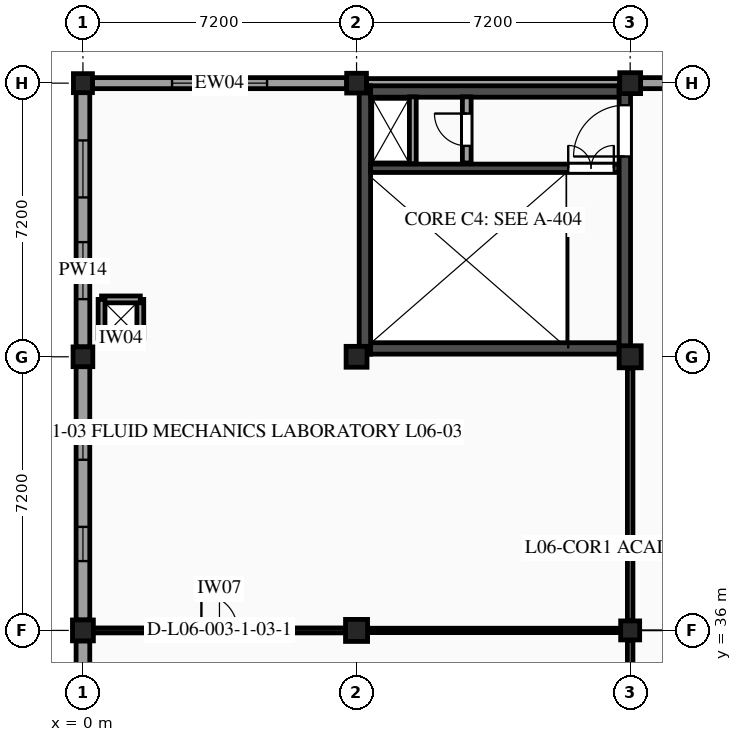
"""IFC4 building model, lengths in metres.
Left out: names, types, materials, properties, quantities, classifications, styles, units other than length and angle.
Written with IfcOpenShell. Run it as: python <this file> out.ifc"""

import sys

from ifc_helpers import new_model, si_unit, direction, frame, frame_2d, origin, origin_2d, place, context, subcontext, project, spatial, rectangle, extrude, element, fill, save


model = new_model("IFC4")
c1 = context("Model", 3, precision=1e-05, world=origin(), true_north=direction((0.0, 1.0)))
c2 = subcontext(c1, "Body", "Model", "MODEL_VIEW")
j1 = project(units=[si_unit("LENGTHUNIT", "METRE"), si_unit("PLANEANGLEUNIT", "RADIAN")], contexts=[c1])
p1 = place(None, origin())
s1 = spatial("IfcSite", under=j1, at=p1, CompositionType="ELEMENT")
p2 = place(p1, origin())
s2 = spatial("IfcBuilding", under=s1, at=p2, CompositionType="ELEMENT")
p3 = place(p2, frame((0.0, 0.0, 26.7)))
s3 = spatial("IfcBuildingStorey", under=s2, at=p3, CompositionType="ELEMENT", Elevation=26.7)
p4 = place(p3, frame((0.0, 36.0, 0.0), z_axis=(0.0, 0.0, 1.0), x_axis=(1.0, 0.0, 0.0)))
e1 = element("IfcColumn", 1, at=p4, inside=s3, PredefinedType="COLUMN", context=c2, shape_type="SweptSolid", body=[
    extrude(rectangle(XDim=0.55, YDim=0.55, at=origin_2d()), origin(), (0.0, 0.0, 1.0), 3.9),
])
p5 = place(p3, frame((0.0, 43.2, 0.0), z_axis=(0.0, 0.0, 1.0), x_axis=(1.0, 0.0, 0.0)))
e2 = element("IfcColumn", 2, at=p5, inside=s3, PredefinedType="COLUMN", context=c2, shape_type="SweptSolid", body=[
    extrude(rectangle(XDim=0.52, YDim=0.52, at=origin_2d()), origin(), (0.0, 0.0, 1.0), 3.9),
])
p6 = place(p3, frame((0.0, 50.4, 0.0), z_axis=(0.0, 0.0, 1.0), x_axis=(1.0, 0.0, 0.0)))
e3 = element("IfcColumn", 3, at=p6, inside=s3, PredefinedType="COLUMN", context=c2, shape_type="SweptSolid", body=[
    extrude(rectangle(XDim=0.5, YDim=0.5, at=origin_2d()), origin(), (0.0, 0.0, 1.0), 3.9),
])
p7 = place(p3, frame((7.2, 36.0, 0.0), z_axis=(0.0, 0.0, 1.0), x_axis=(1.0, 0.0, 0.0)))
e4 = element("IfcColumn", 4, at=p7, inside=s3, PredefinedType="COLUMN", context=c2, shape_type="SweptSolid", body=[
    extrude(rectangle(XDim=0.58, YDim=0.58, at=origin_2d()), origin(), (0.0, 0.0, 1.0), 3.9),
])
p8 = place(p3, frame((7.2, 43.2, 0.0), z_axis=(0.0, 0.0, 1.0), x_axis=(1.0, 0.0, 0.0)))
e5 = element("IfcColumn", 5, at=p8, inside=s3, PredefinedType="COLUMN", context=c2, shape_type="SweptSolid", body=[
    extrude(rectangle(XDim=0.55, YDim=0.55, at=origin_2d()), origin(), (0.0, 0.0, 1.0), 3.9),
])
p9 = place(p3, frame((7.2, 50.4, 0.0), z_axis=(0.0, 0.0, 1.0), x_axis=(1.0, 0.0, 0.0)))
e6 = element("IfcColumn", 6, at=p9, inside=s3, PredefinedType="COLUMN", context=c2, shape_type="SweptSolid", body=[
    extrude(rectangle(XDim=0.52, YDim=0.52, at=origin_2d()), origin(), (0.0, 0.0, 1.0), 3.9),
])
p10 = place(p3, frame((14.4, 36.0, 0.0), z_axis=(0.0, 0.0, 1.0), x_axis=(1.0, 0.0, 0.0)))
e7 = element("IfcColumn", 7, at=p10, inside=s3, PredefinedType="COLUMN", context=c2, shape_type="SweptSolid", body=[
    extrude(rectangle(XDim=0.5, YDim=0.5, at=origin_2d()), origin(), (0.0, 0.0, 1.0), 3.9),
])
p11 = place(p3, frame((14.4, 43.2, 0.0), z_axis=(0.0, 0.0, 1.0), x_axis=(1.0, 0.0, 0.0)))
e8 = element("IfcColumn", 8, at=p11, inside=s3, PredefinedType="COLUMN", context=c2, shape_type="SweptSolid", body=[
    extrude(rectangle(XDim=0.58, YDim=0.58, at=origin_2d()), origin(), (0.0, 0.0, 1.0), 3.9),
])
p12 = place(p3, frame((14.4, 50.4, 0.0), z_axis=(0.0, 0.0, 1.0), x_axis=(1.0, 0.0, 0.0)))
e9 = element("IfcColumn", 9, at=p12, inside=s3, PredefinedType="COLUMN", context=c2, shape_type="SweptSolid", body=[
    extrude(rectangle(XDim=0.55, YDim=0.55, at=origin_2d()), origin(), (0.0, 0.0, 1.0), 3.9),
])
p13 = place(p3, frame((0.0, 29.09, 0.0), z_axis=(0.0, 0.0, 1.0), x_axis=(0.0, 1.0, 0.0)))
e10 = element("IfcWall", 10, at=p13, inside=s3, PredefinedType="STANDARD", context=c2, shape_type="SweptSolid", body=[
    extrude(rectangle(XDim=6.635, YDim=0.36, at=frame_2d((3.317, 0.0))), origin(), (0.0, 0.0, 1.0), 2.83),
])
p14 = place(p13, frame((1.466, 0.0, 1.15)))
e11 = element("IfcOpeningElement", 11, at=p14, cuts=e10, PredefinedType="OPENING", context=c2, shape_type="SweptSolid", body=[
    extrude(rectangle(XDim=1.05, YDim=1.35, at=frame_2d((0.525, 0.675))), frame((0.0, 0.19, 0.0), z_axis=(0.0, -1.0, 0.0), x_axis=(1.0, 0.0, 0.0)), (0.0, 0.0, 1.0), 0.38),
])
p15 = place(p13, frame((4.119, 0.0, 1.15)))
e12 = element("IfcOpeningElement", 12, at=p15, cuts=e10, PredefinedType="OPENING", context=c2, shape_type="SweptSolid", body=[
    extrude(rectangle(XDim=1.05, YDim=1.35, at=frame_2d((0.525, 0.675))), frame((0.0, 0.19, 0.0), z_axis=(0.0, -1.0, 0.0), x_axis=(1.0, 0.0, 0.0)), (0.0, 0.0, 1.0), 0.38),
])
p16 = place(p3, frame((0.0, 36.275, 0.0), z_axis=(0.0, 0.0, 1.0), x_axis=(0.0, 1.0, 0.0)))
e13 = element("IfcWall", 13, at=p16, inside=s3, PredefinedType="STANDARD", context=c2, shape_type="SweptSolid", body=[
    extrude(rectangle(XDim=6.665, YDim=0.36, at=frame_2d((3.333, 0.0))), origin(), (0.0, 0.0, 1.0), 2.83),
])
p17 = place(p16, frame((1.55, 0.0, 1.15)))
e14 = element("IfcOpeningElement", 14, at=p17, cuts=e13, PredefinedType="OPENING", context=c2, shape_type="SweptSolid", body=[
    extrude(rectangle(XDim=0.9, YDim=1.3, at=frame_2d((0.45, 0.65))), frame((0.0, 0.19, 0.0), z_axis=(0.0, -1.0, 0.0), x_axis=(1.0, 0.0, 0.0)), (0.0, 0.0, 1.0), 0.38),
])
p18 = place(p16, frame((4.216, 0.0, 1.15)))
e15 = element("IfcOpeningElement", 15, at=p18, cuts=e13, PredefinedType="OPENING", context=c2, shape_type="SweptSolid", body=[
    extrude(rectangle(XDim=0.9, YDim=1.3, at=frame_2d((0.45, 0.65))), frame((0.0, 0.19, 0.0), z_axis=(0.0, -1.0, 0.0), x_axis=(1.0, 0.0, 0.0)), (0.0, 0.0, 1.0), 0.38),
])
p19 = place(p3, frame((0.0, 43.46, 0.0), z_axis=(0.0, 0.0, 1.0), x_axis=(0.0, 1.0, 0.0)))
e16 = element("IfcWall", 16, at=p19, inside=s3, PredefinedType="STANDARD", context=c2, shape_type="SweptSolid", body=[
    extrude(rectangle(XDim=6.69, YDim=0.36, at=frame_2d((3.345, 0.0))), origin(), (0.0, 0.0, 1.0), 2.83),
])
p20 = place(p19, frame((1.257, 0.0, 1.15)))
e17 = element("IfcOpeningElement", 17, at=p20, cuts=e16, PredefinedType="OPENING", context=c2, shape_type="SweptSolid", body=[
    extrude(rectangle(XDim=1.5, YDim=1.2, at=frame_2d((0.75, 0.6))), frame((0.0, 0.19, 0.0), z_axis=(0.0, -1.0, 0.0), x_axis=(1.0, 0.0, 0.0)), (0.0, 0.0, 1.0), 0.38),
])
p21 = place(p19, frame((3.933, 0.0, 1.15)))
e18 = element("IfcOpeningElement", 18, at=p21, cuts=e16, PredefinedType="OPENING", context=c2, shape_type="SweptSolid", body=[
    extrude(rectangle(XDim=1.5, YDim=1.2, at=frame_2d((0.75, 0.6))), frame((0.0, 0.19, 0.0), z_axis=(0.0, -1.0, 0.0), x_axis=(1.0, 0.0, 0.0)), (0.0, 0.0, 1.0), 0.38),
])
p22 = place(p3, frame((0.25, 50.4, 0.0), z_axis=(0.0, 0.0, 1.0), x_axis=(1.0, 0.0, 0.0)))
e19 = element("IfcWall", 19, at=p22, inside=s3, PredefinedType="STANDARD", context=c2, shape_type="SweptSolid", body=[
    extrude(rectangle(XDim=6.69, YDim=0.29, at=frame_2d((3.345, 0.0))), origin(), (0.0, 0.0, 1.0), 2.83),
])
p23 = place(p22, frame((2.095, 0.0, 0.98)))
e20 = element("IfcOpeningElement", 20, at=p23, cuts=e19, PredefinedType="OPENING", context=c2, shape_type="SweptSolid", body=[
    extrude(rectangle(XDim=2.5, YDim=1.35, at=frame_2d((1.25, 0.675))), frame((0.0, 0.155, 0.0), z_axis=(0.0, -1.0, 0.0), x_axis=(1.0, 0.0, 0.0)), (0.0, 0.0, 1.0), 0.31),
])
p24 = place(p3, frame((7.46, 50.4, 0.0), z_axis=(0.0, 0.0, 1.0), x_axis=(1.0, 0.0, 0.0)))
e21 = element("IfcWall", 21, at=p24, inside=s3, PredefinedType="STANDARD", context=c2, shape_type="SweptSolid", body=[
    extrude(rectangle(XDim=6.665, YDim=0.24, at=frame_2d((3.333, 0.0))), origin(), (0.0, 0.0, 1.0), 2.83),
])
p25 = place(p3, frame((14.675, 50.4, 0.0), z_axis=(0.0, 0.0, 1.0), x_axis=(1.0, 0.0, 0.0)))
e22 = element("IfcWall", 22, at=p25, inside=s3, PredefinedType="STANDARD", context=c2, shape_type="SweptSolid", body=[
    extrude(rectangle(XDim=6.635, YDim=0.29, at=frame_2d((3.317, 0.0))), origin(), (0.0, 0.0, 1.0), 2.83),
])
p26 = place(p25, frame((0.917, 0.0, 0.98)))
e23 = element("IfcOpeningElement", 23, at=p26, cuts=e22, PredefinedType="OPENING", context=c2, shape_type="SweptSolid", body=[
    extrude(rectangle(XDim=4.8, YDim=1.5, at=frame_2d((2.4, 0.75))), frame((0.0, 0.155, 0.0), z_axis=(0.0, -1.0, 0.0), x_axis=(1.0, 0.0, 0.0)), (0.0, 0.0, 1.0), 0.31),
])
p27 = place(p3, frame((7.57, 43.42, 0.0), z_axis=(0.0, 0.0, 1.0), x_axis=(1.0, 0.0, 0.0)))
e24 = element("IfcWall", 24, at=p27, inside=s3, PredefinedType="SHEAR", context=c2, shape_type="SweptSolid", body=[
    extrude(rectangle(XDim=6.54, YDim=0.3, at=frame_2d((3.27, 0.0))), origin(), (0.0, 0.0, 1.0), 3.67),
])
p28 = place(p3, frame((7.42, 50.33, 0.0), z_axis=(0.0, 0.0, 1.0), x_axis=(0.0, -1.0, 0.0)))
e25 = element("IfcWall", 25, at=p28, inside=s3, PredefinedType="SHEAR", context=c2, shape_type="SweptSolid", body=[
    extrude(rectangle(XDim=7.06, YDim=0.3, at=frame_2d((3.53, 0.0))), origin(), (0.0, 0.0, 1.0), 3.67),
])
p29 = place(p3, frame((7.57, 50.18, 0.0), z_axis=(0.0, 0.0, 1.0), x_axis=(1.0, 0.0, 0.0)))
e26 = element("IfcWall", 26, at=p29, inside=s3, PredefinedType="SHEAR", context=c2, shape_type="SweptSolid", body=[
    extrude(rectangle(XDim=6.54, YDim=0.3, at=frame_2d((3.27, 0.0))), origin(), (0.0, 0.0, 1.0), 3.67),
])
p30 = place(p3, frame((7.57, 48.16, 0.0), z_axis=(0.0, 0.0, 1.0), x_axis=(1.0, 0.0, 0.0)))
e27 = element("IfcWall", 27, at=p30, inside=s3, PredefinedType="SHEAR", context=c2, shape_type="SweptSolid", body=[
    extrude(rectangle(XDim=6.54, YDim=0.22, at=frame_2d((3.27, 0.0))), origin(), (0.0, 0.0, 1.0), 3.67),
])
p31 = place(p30, frame((5.2, 0.0, 0.0)))
e28 = element("IfcOpeningElement", 28, at=p31, cuts=e27, PredefinedType="OPENING", context=c2, shape_type="SweptSolid", body=[
    extrude(rectangle(XDim=1.2, YDim=2.2, at=frame_2d((0.6, 1.1))), frame((0.0, 0.12, 0.0), z_axis=(0.0, -1.0, 0.0), x_axis=(1.0, 0.0, 0.0)), (0.0, 0.0, 1.0), 0.24),
])
p32 = place(p3, frame((10.1, 48.3, 0.0), z_axis=(0.0, 0.0, 1.0), x_axis=(0.0, 1.0, 0.0)))
e29 = element("IfcWall", 29, at=p32, inside=s3, PredefinedType="PARTITIONING", context=c2, shape_type="SweptSolid", body=[
    extrude(rectangle(XDim=1.74, YDim=0.23, at=frame_2d((0.87, 0.0))), origin(), (0.0, 0.0, 1.0), 3.67),
])
p33 = place(p32, frame((0.45, 0.0, 0.0)))
e30 = element("IfcOpeningElement", 30, at=p33, cuts=e29, PredefinedType="OPENING", context=c2, shape_type="SweptSolid", body=[
    extrude(rectangle(XDim=0.85, YDim=2.1, at=frame_2d((0.425, 1.05))), frame((0.0, 0.125, 0.0), z_axis=(0.0, -1.0, 0.0), x_axis=(1.0, 0.0, 0.0)), (0.0, 0.0, 1.0), 0.25),
])
p34 = place(p3, frame((8.68, 48.28, 0.0), z_axis=(0.0, 0.0, 1.0), x_axis=(0.0, 1.0, 0.0)))
e31 = element("IfcWall", 31, at=p34, inside=s3, PredefinedType="PARTITIONING", context=c2, shape_type="SweptSolid", body=[
    extrude(rectangle(XDim=1.76, YDim=0.18, at=frame_2d((0.88, 0.0))), origin(), (0.0, 0.0, 1.0), 3.67),
])
p35 = place(p3, frame((14.26, 43.27, 0.0), z_axis=(0.0, 0.0, 1.0), x_axis=(0.0, 1.0, 0.0)))
e32 = element("IfcWall", 32, at=p35, inside=s3, PredefinedType="SHEAR", context=c2, shape_type="SweptSolid", body=[
    extrude(rectangle(XDim=7.06, YDim=0.3, at=frame_2d((3.53, 0.0))), origin(), (0.0, 0.0, 1.0), 3.67),
])
p36 = place(p35, frame((5.2, 0.0, 0.0)))
e33 = element("IfcOpeningElement", 33, at=p36, cuts=e32, PredefinedType="OPENING", context=c2, shape_type="SweptSolid", body=[
    extrude(rectangle(XDim=1.35, YDim=2.15, at=frame_2d((0.675, 1.075))), frame((0.0, 0.16, 0.0), z_axis=(0.0, -1.0, 0.0), x_axis=(1.0, 0.0, 0.0)), (0.0, 0.0, 1.0), 0.32),
])
for number, where, z_axis, x_axis in (
    (34, (0.49, 43.69, 0.0), (0.0, 0.0, 1.0), (1.0, 0.0, 0.0)),
    (35, (1.51, 43.69, 0.0), (0.0, 0.0, 1.0), (0.0, 1.0, 0.0)),
    (36, (1.51, 44.71, 0.0), (0.0, 0.0, 1.0), (-1.0, 0.0, 0.0)),
    (37, (0.49, 44.71, 0.0), (0.0, 0.0, 1.0), (0.0, -1.0, 0.0)),
):
    element("IfcWall", number, at=place(p3, frame(where, z_axis=z_axis, x_axis=x_axis)), inside=s3, PredefinedType="PARTITIONING", context=c2, shape_type="SweptSolid", body=[
        extrude(rectangle(XDim=1.02, YDim=0.18, at=frame_2d((0.51, 0.0))), origin(), (0.0, 0.0, 1.0), 3.67),
    ])
p37 = place(p3, frame((0.28, 36.0, 0.0), z_axis=(0.0, 0.0, 1.0), x_axis=(1.0, 0.0, 0.0)))
e38 = element("IfcWall", 38, at=p37, inside=s3, PredefinedType="PARTITIONING", context=c2, shape_type="SweptSolid", body=[
    extrude(rectangle(XDim=6.625, YDim=0.13, at=frame_2d((3.312, 0.0))), origin(), (0.0, 0.0, 1.0), 2.975),
])
p38 = place(p37, frame((2.837, 0.0, 0.0)))
e39 = element("IfcOpeningElement", 39, at=p38, cuts=e38, PredefinedType="OPENING", context=c2, shape_type="SweptSolid", body=[
    extrude(rectangle(XDim=0.95, YDim=2.15, at=frame_2d((0.475, 1.075))), frame((0.0, 0.075, 0.0), z_axis=(0.0, -1.0, 0.0), x_axis=(1.0, 0.0, 0.0)), (0.0, 0.0, 1.0), 0.15),
])
p39 = place(p3, frame((14.4, 29.065, 0.0), z_axis=(0.0, 0.0, 1.0), x_axis=(0.0, 1.0, 0.0)))
e40 = element("IfcWall", 40, at=p39, inside=s3, PredefinedType="PARTITIONING", context=c2, shape_type="SweptSolid", body=[
    extrude(rectangle(XDim=6.68, YDim=0.145, at=frame_2d((3.34, 0.0))), origin(), (0.0, 0.0, 1.0), 2.945),
])
p40 = place(p3, frame((7.495, 36.0, 0.0), z_axis=(0.0, 0.0, 1.0), x_axis=(1.0, 0.0, 0.0)))
e41 = element("IfcWall", 41, at=p40, inside=s3, PredefinedType="PARTITIONING", context=c2, shape_type="SweptSolid", body=[
    extrude(rectangle(XDim=6.65, YDim=0.115, at=frame_2d((3.325, 0.0))), origin(), (0.0, 0.0, 1.0), 2.985),
])
p41 = place(p3, frame((14.4, 36.255, 0.0), z_axis=(0.0, 0.0, 1.0), x_axis=(0.0, 1.0, 0.0)))
e42 = element("IfcWall", 42, at=p41, inside=s3, PredefinedType="PARTITIONING", context=c2, shape_type="SweptSolid", body=[
    extrude(rectangle(XDim=6.65, YDim=0.145, at=frame_2d((3.325, 0.0))), origin(), (0.0, 0.0, 1.0), 2.94),
])
p42 = place(p17, origin())
e43 = element("IfcWindow", 43, at=p42, inside=s3, PartitioningType="SINGLE_PANEL", PredefinedType="WINDOW", context=c2, shape_type="SweptSolid", body=[
    extrude(rectangle(XDim=0.9, YDim=1.3, at=frame_2d((0.45, 0.65))), frame((0.0, -0.08, 0.0), z_axis=(0.0, -1.0, 0.0), x_axis=(1.0, 0.0, 0.0)), (0.0, 0.0, 1.0), 0.06),
])
fill(e14, e43)
p43 = place(p18, origin())
e44 = element("IfcWindow", 44, at=p43, inside=s3, PartitioningType="SINGLE_PANEL", PredefinedType="WINDOW", context=c2, shape_type="SweptSolid", body=[
    extrude(rectangle(XDim=0.9, YDim=1.3, at=frame_2d((0.45, 0.65))), frame((0.0, -0.08, 0.0), z_axis=(0.0, -1.0, 0.0), x_axis=(1.0, 0.0, 0.0)), (0.0, 0.0, 1.0), 0.06),
])
fill(e15, e44)
p44 = place(p20, origin())
e45 = element("IfcWindow", 45, at=p44, inside=s3, PartitioningType="SINGLE_PANEL", PredefinedType="WINDOW", context=c2, shape_type="SweptSolid", body=[
    extrude(rectangle(XDim=1.5, YDim=1.2, at=frame_2d((0.75, 0.6))), frame((0.0, -0.08, 0.0), z_axis=(0.0, -1.0, 0.0), x_axis=(1.0, 0.0, 0.0)), (0.0, 0.0, 1.0), 0.06),
])
fill(e17, e45)
p45 = place(p21, origin())
e46 = element("IfcWindow", 46, at=p45, inside=s3, PartitioningType="SINGLE_PANEL", PredefinedType="WINDOW", context=c2, shape_type="SweptSolid", body=[
    extrude(rectangle(XDim=1.5, YDim=1.2, at=frame_2d((0.75, 0.6))), frame((0.0, -0.08, 0.0), z_axis=(0.0, -1.0, 0.0), x_axis=(1.0, 0.0, 0.0)), (0.0, 0.0, 1.0), 0.06),
])
fill(e18, e46)
p46 = place(p23, origin())
e47 = element("IfcWindow", 47, at=p46, inside=s3, PartitioningType="SINGLE_PANEL", PredefinedType="WINDOW", context=c2, shape_type="SweptSolid", body=[
    extrude(rectangle(XDim=2.5, YDim=1.35, at=frame_2d((1.25, 0.675))), frame((0.0, -0.03, 0.0), z_axis=(0.0, -1.0, 0.0), x_axis=(1.0, 0.0, 0.0)), (0.0, 0.0, 1.0), 0.06),
])
fill(e20, e47)
p47 = place(p33, origin())
e48 = element("IfcDoor", 48, at=p47, inside=s3, OperationType="SINGLE_SWING_RIGHT", PredefinedType="DOOR", context=c2, shape_type="SweptSolid", body=[
    extrude(rectangle(XDim=0.85, YDim=2.1, at=frame_2d((0.425, 1.05))), frame((0.0, 0.025, 0.0), z_axis=(0.0, -1.0, 0.0), x_axis=(1.0, 0.0, 0.0)), (0.0, 0.0, 1.0), 0.05),
])
fill(e30, e48)
p48 = place(p31, origin())
e49 = element("IfcDoor", 49, at=p48, inside=s3, OperationType="DOUBLE_DOOR_SINGLE_SWING", PredefinedType="DOOR", context=c2, shape_type="SweptSolid", body=[
    extrude(rectangle(XDim=1.2, YDim=2.2, at=frame_2d((0.6, 1.1))), frame((0.0, 0.025, 0.0), z_axis=(0.0, -1.0, 0.0), x_axis=(1.0, 0.0, 0.0)), (0.0, 0.0, 1.0), 0.05),
])
fill(e28, e49)
p49 = place(p36, origin())
e50 = element("IfcDoor", 50, at=p49, inside=s3, OperationType="SINGLE_SWING_LEFT", PredefinedType="DOOR", context=c2, shape_type="SweptSolid", body=[
    extrude(rectangle(XDim=1.35, YDim=2.15, at=frame_2d((0.675, 1.075))), frame((0.0, 0.025, 0.0), z_axis=(0.0, -1.0, 0.0), x_axis=(1.0, 0.0, 0.0)), (0.0, 0.0, 1.0), 0.05),
])
fill(e33, e50)
p50 = place(p38, origin())
e51 = element("IfcDoor", 51, at=p50, inside=s3, OperationType="SINGLE_SWING_LEFT", PredefinedType="DOOR", context=c2, shape_type="SweptSolid", body=[
    extrude(rectangle(XDim=0.95, YDim=2.15, at=frame_2d((0.475, 1.075))), frame((0.0, 0.025, 0.0), z_axis=(0.0, -1.0, 0.0), x_axis=(1.0, 0.0, 0.0)), (0.0, 0.0, 1.0), 0.05),
])
fill(e39, e51)
save(model, sys.argv[1])
